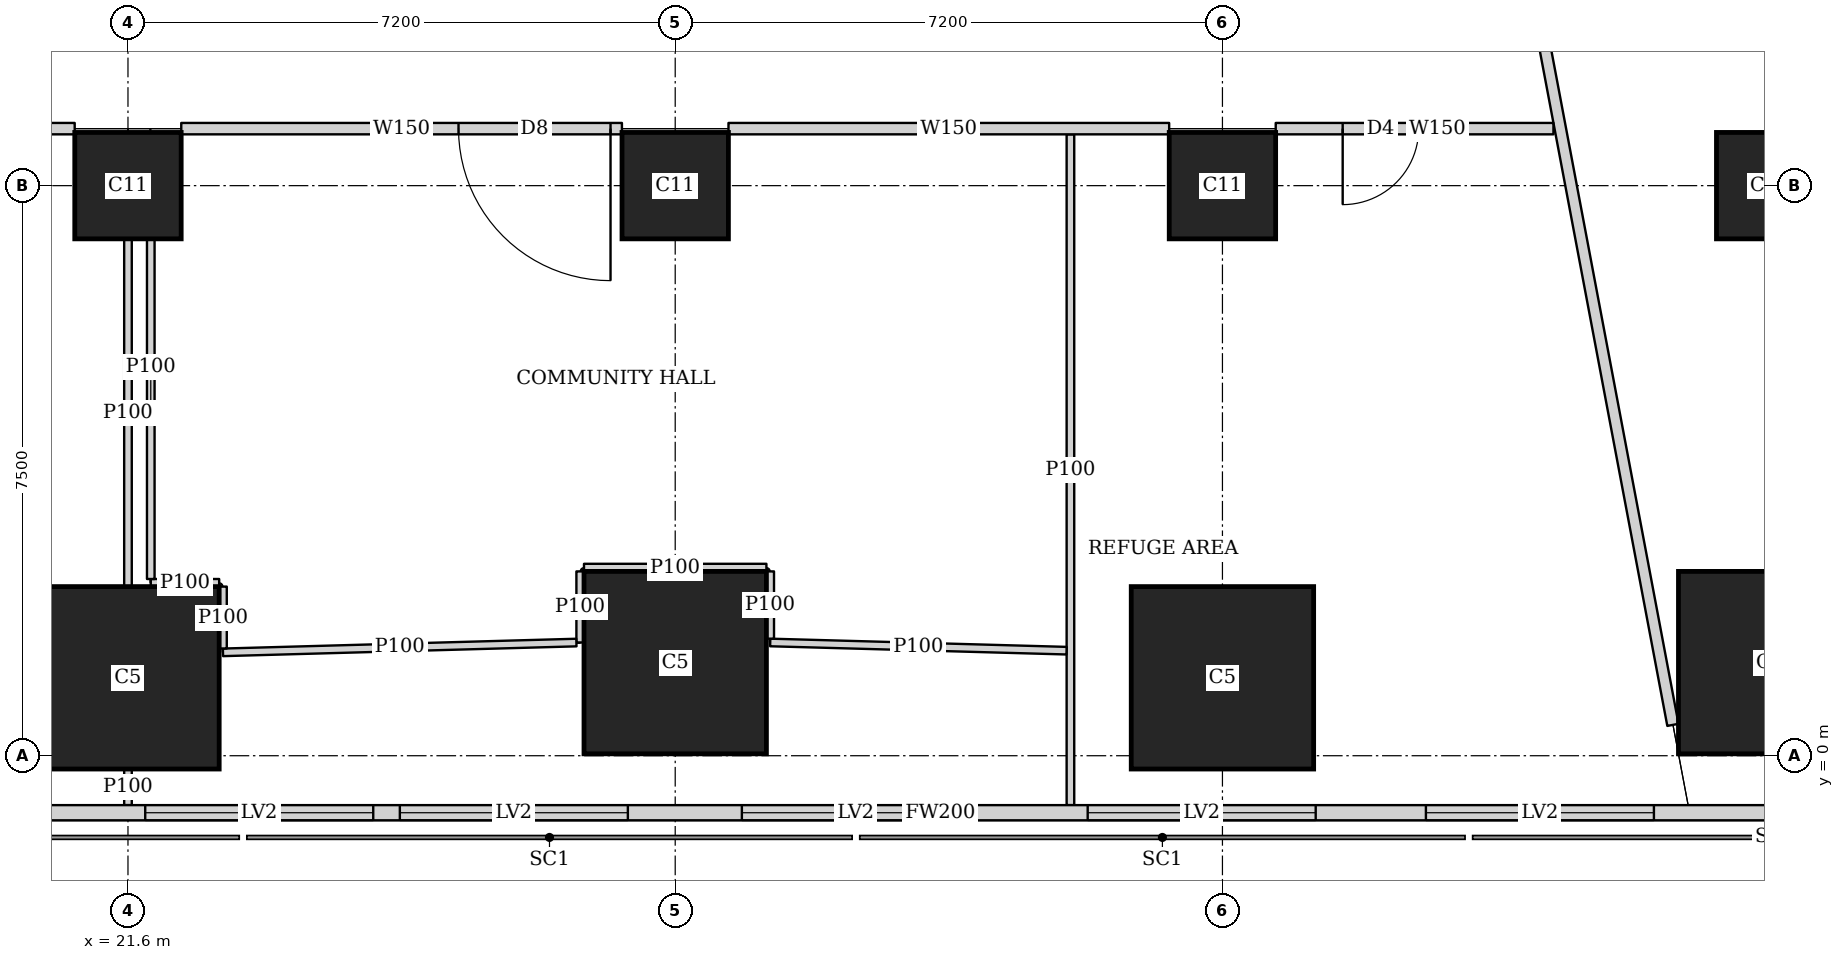
"""IFC4 building model, lengths in metres.
Left out: names, types, materials, properties, quantities, classifications, styles, units other than length and angle.
Written with IfcOpenShell. Run it as: python <this file> out.ifc"""

import sys

from ifc_helpers import new_model, si_unit, direction, frame, frame_2d, origin, origin_2d, place, context, subcontext, project, spatial, rectangle, extrude, element, fill, save


model = new_model("IFC4")
c1 = context("Model", 3, precision=1e-05, world=origin(), true_north=direction((0.0, 1.0)))
c2 = subcontext(c1, "Body", "Model", "MODEL_VIEW")
j1 = project(units=[si_unit("LENGTHUNIT", "METRE"), si_unit("PLANEANGLEUNIT", "RADIAN")], contexts=[c1])
p1 = place(None, origin())
s1 = spatial("IfcSite", under=j1, at=p1, CompositionType="ELEMENT")
p2 = place(p1, origin())
s2 = spatial("IfcBuilding", under=s1, at=p2, CompositionType="ELEMENT")
p3 = place(p2, frame((0.0, 0.0, 246.2)))
s3 = spatial("IfcBuildingStorey", under=s2, at=p3, CompositionType="ELEMENT", Elevation=246.2)
for number, where, z_axis, x_axis in (
    (1, (21.6, 1.025, 0.0), (0.0, 0.0, 1.0), (1.0, 0.0, 0.0)),
    (2, (28.8, 1.225, 0.0), (0.0, 0.0, 1.0), (1.0, 0.0, 0.0)),
    (3, (36.0, 1.025, 0.0), (0.0, 0.0, 1.0), (1.0, 0.0, 0.0)),
    (4, (43.2, 1.225, 0.0), (0.0, 0.0, 1.0), (1.0, 0.0, 0.0)),
):
    element("IfcColumn", number, at=place(p3, frame(where, z_axis=z_axis, x_axis=x_axis)), inside=s3, PredefinedType="COLUMN", context=c2, shape_type="SweptSolid", body=[
        extrude(rectangle(XDim=2.4, YDim=2.4, at=origin_2d()), origin(), (0.0, 0.0, 1.0), 5.4),
    ])
for number, where, z_axis, x_axis in (
    (5, (21.6, 7.5, 0.0), (0.0, 0.0, 1.0), (1.0, 0.0, 0.0)),
    (6, (28.8, 7.5, 0.0), (0.0, 0.0, 1.0), (1.0, 0.0, 0.0)),
    (7, (36.0, 7.5, 0.0), (0.0, 0.0, 1.0), (1.0, 0.0, 0.0)),
    (8, (43.2, 7.5, 0.0), (0.0, 0.0, 1.0), (1.0, 0.0, 0.0)),
):
    element("IfcColumn", number, at=place(p3, frame(where, z_axis=z_axis, x_axis=x_axis)), inside=s3, PredefinedType="COLUMN", context=c2, shape_type="SweptSolid", body=[
        extrude(rectangle(XDim=1.4, YDim=1.4, at=origin_2d()), origin(), (0.0, 0.0, 1.0), 5.4),
    ])
p4 = place(p3, frame((16.787, -0.75, 0.0), z_axis=(0.0, 0.0, 1.0), x_axis=(1.0, 0.0, 0.0)))
e9 = element("IfcWall", 9, at=p4, inside=s3, PredefinedType="SOLIDWALL", context=c2, shape_type="SweptSolid", body=[
    extrude(rectangle(XDim=31.004, YDim=0.2, at=frame_2d((15.502, 0.0))), origin(), (0.0, 0.0, 1.0), 5.15),
])
p5 = place(p4, frame((5.04, 0.0, 0.6)))
e10 = element("IfcOpeningElement", 10, at=p5, cuts=e9, PredefinedType="OPENING", context=c2, shape_type="SweptSolid", body=[
    extrude(rectangle(XDim=3.0, YDim=2.7, at=frame_2d((1.5, 1.35))), frame((0.0, 0.11, 0.0), z_axis=(0.0, -1.0, 0.0), x_axis=(1.0, 0.0, 0.0)), (0.0, 0.0, 1.0), 0.22),
])
p6 = place(p4, frame((8.39, 0.0, 0.6)))
e11 = element("IfcOpeningElement", 11, at=p6, cuts=e9, PredefinedType="OPENING", context=c2, shape_type="SweptSolid", body=[
    extrude(rectangle(XDim=3.0, YDim=2.7, at=frame_2d((1.5, 1.35))), frame((0.0, 0.11, 0.0), z_axis=(0.0, -1.0, 0.0), x_axis=(1.0, 0.0, 0.0)), (0.0, 0.0, 1.0), 0.22),
])
p7 = place(p4, frame((12.89, 0.0, 0.6)))
e12 = element("IfcOpeningElement", 12, at=p7, cuts=e9, PredefinedType="OPENING", context=c2, shape_type="SweptSolid", body=[
    extrude(rectangle(XDim=3.0, YDim=2.7, at=frame_2d((1.5, 1.35))), frame((0.0, 0.11, 0.0), z_axis=(0.0, -1.0, 0.0), x_axis=(1.0, 0.0, 0.0)), (0.0, 0.0, 1.0), 0.22),
])
p8 = place(p4, frame((17.44, 0.0, 0.6)))
e13 = element("IfcOpeningElement", 13, at=p8, cuts=e9, PredefinedType="OPENING", context=c2, shape_type="SweptSolid", body=[
    extrude(rectangle(XDim=3.0, YDim=2.7, at=frame_2d((1.5, 1.35))), frame((0.0, 0.11, 0.0), z_axis=(0.0, -1.0, 0.0), x_axis=(1.0, 0.0, 0.0)), (0.0, 0.0, 1.0), 0.22),
])
p9 = place(p4, frame((21.89, 0.0, 0.6)))
e14 = element("IfcOpeningElement", 14, at=p9, cuts=e9, PredefinedType="OPENING", context=c2, shape_type="SweptSolid", body=[
    extrude(rectangle(XDim=3.0, YDim=2.7, at=frame_2d((1.5, 1.35))), frame((0.0, 0.11, 0.0), z_axis=(0.0, -1.0, 0.0), x_axis=(1.0, 0.0, 0.0)), (0.0, 0.0, 1.0), 0.22),
])
p10 = place(p4, frame((26.39, 0.0, 0.6)))
e15 = element("IfcOpeningElement", 15, at=p10, cuts=e9, PredefinedType="OPENING", context=c2, shape_type="SweptSolid", body=[
    extrude(rectangle(XDim=3.0, YDim=2.7, at=frame_2d((1.5, 1.35))), frame((0.0, 0.11, 0.0), z_axis=(0.0, -1.0, 0.0), x_axis=(1.0, 0.0, 0.0)), (0.0, 0.0, 1.0), 0.22),
])
p11 = place(p3, frame((50.653, 2.703, 0.0), z_axis=(0.0, 0.0, 1.0), x_axis=(-0.185612026696, 0.982623109613, 0.0)))
e16 = element("IfcWall", 16, at=p11, inside=s3, PredefinedType="SOLIDWALL", context=c2, shape_type="SweptSolid", body=[
    extrude(rectangle(XDim=41.393, YDim=0.2, at=frame_2d((20.697, 0.0))), origin(), (0.0, 0.0, 1.0), 5.15),
])
p12 = place(p11, frame((1.197, 0.0, 0.6)))
e17 = element("IfcOpeningElement", 17, at=p12, cuts=e16, PredefinedType="OPENING", context=c2, shape_type="SweptSolid", body=[
    extrude(rectangle(XDim=3.0, YDim=2.7, at=frame_2d((1.5, 1.35))), frame((0.0, 0.11, 0.0), z_axis=(0.0, -1.0, 0.0), x_axis=(1.0, 0.0, 0.0)), (0.0, 0.0, 1.0), 0.22),
])
p13 = place(p11, frame((5.697, 0.0, 0.6)))
e18 = element("IfcOpeningElement", 18, at=p13, cuts=e16, PredefinedType="OPENING", context=c2, shape_type="SweptSolid", body=[
    extrude(rectangle(XDim=3.0, YDim=2.7, at=frame_2d((1.5, 1.35))), frame((0.0, 0.11, 0.0), z_axis=(0.0, -1.0, 0.0), x_axis=(1.0, 0.0, 0.0)), (0.0, 0.0, 1.0), 0.22),
])
p14 = place(p11, frame((10.197, 0.0, 0.6)))
e19 = element("IfcOpeningElement", 19, at=p14, cuts=e16, PredefinedType="OPENING", context=c2, shape_type="SweptSolid", body=[
    extrude(rectangle(XDim=3.0, YDim=2.7, at=frame_2d((1.5, 1.35))), frame((0.0, 0.11, 0.0), z_axis=(0.0, -1.0, 0.0), x_axis=(1.0, 0.0, 0.0)), (0.0, 0.0, 1.0), 0.22),
])
p15 = place(p11, frame((14.697, 0.0, 0.6)))
e20 = element("IfcOpeningElement", 20, at=p15, cuts=e16, PredefinedType="OPENING", context=c2, shape_type="SweptSolid", body=[
    extrude(rectangle(XDim=3.0, YDim=2.7, at=frame_2d((1.5, 1.35))), frame((0.0, 0.11, 0.0), z_axis=(0.0, -1.0, 0.0), x_axis=(1.0, 0.0, 0.0)), (0.0, 0.0, 1.0), 0.22),
])
p16 = place(p11, frame((19.197, 0.0, 0.6)))
e21 = element("IfcOpeningElement", 21, at=p16, cuts=e16, PredefinedType="OPENING", context=c2, shape_type="SweptSolid", body=[
    extrude(rectangle(XDim=3.0, YDim=2.7, at=frame_2d((1.5, 1.35))), frame((0.0, 0.11, 0.0), z_axis=(0.0, -1.0, 0.0), x_axis=(1.0, 0.0, 0.0)), (0.0, 0.0, 1.0), 0.22),
])
p17 = place(p11, frame((23.697, 0.0, 0.6)))
e22 = element("IfcOpeningElement", 22, at=p17, cuts=e16, PredefinedType="OPENING", context=c2, shape_type="SweptSolid", body=[
    extrude(rectangle(XDim=3.0, YDim=2.7, at=frame_2d((1.5, 1.35))), frame((0.0, 0.11, 0.0), z_axis=(0.0, -1.0, 0.0), x_axis=(1.0, 0.0, 0.0)), (0.0, 0.0, 1.0), 0.22),
])
p18 = place(p11, frame((28.197, 0.0, 0.6)))
e23 = element("IfcOpeningElement", 23, at=p18, cuts=e16, PredefinedType="OPENING", context=c2, shape_type="SweptSolid", body=[
    extrude(rectangle(XDim=3.0, YDim=2.7, at=frame_2d((1.5, 1.35))), frame((0.0, 0.11, 0.0), z_axis=(0.0, -1.0, 0.0), x_axis=(1.0, 0.0, 0.0)), (0.0, 0.0, 1.0), 0.22),
])
p19 = place(p11, frame((31.497, 0.0, 0.6)))
e24 = element("IfcOpeningElement", 24, at=p19, cuts=e16, PredefinedType="OPENING", context=c2, shape_type="SweptSolid", body=[
    extrude(rectangle(XDim=3.0, YDim=2.7, at=frame_2d((1.5, 1.35))), frame((0.0, 0.11, 0.0), z_axis=(0.0, -1.0, 0.0), x_axis=(1.0, 0.0, 0.0)), (0.0, 0.0, 1.0), 0.22),
])
p20 = place(p11, frame((35.497, 0.0, 0.6)))
e25 = element("IfcOpeningElement", 25, at=p20, cuts=e16, PredefinedType="OPENING", context=c2, shape_type="SweptSolid", body=[
    extrude(rectangle(XDim=3.0, YDim=2.7, at=frame_2d((1.5, 1.35))), frame((0.0, 0.11, 0.0), z_axis=(0.0, -1.0, 0.0), x_axis=(1.0, 0.0, 0.0)), (0.0, 0.0, 1.0), 0.22),
])
p21 = place(p3, frame((40.355, 8.25, 0.0), z_axis=(0.0, 0.0, 1.0), x_axis=(-1.0, 0.0, 0.0)))
e26 = element("IfcWall", 26, at=p21, inside=s3, PredefinedType="SOLIDWALL", context=c2, shape_type="SweptSolid", body=[
    extrude(rectangle(XDim=3.654, YDim=0.15, at=frame_2d((1.827, 0.0))), origin(), (0.0, 0.0, 1.0), 3.55),
])
p22 = place(p21, frame((1.773, 0.0, 0.0)))
e27 = element("IfcOpeningElement", 27, at=p22, cuts=e26, PredefinedType="OPENING", context=c2, shape_type="SweptSolid", body=[
    extrude(rectangle(XDim=1.0, YDim=2.1, at=frame_2d((0.5, 1.05))), frame((0.0, 0.085, 0.0), z_axis=(0.0, -1.0, 0.0), x_axis=(1.0, 0.0, 0.0)), (0.0, 0.0, 1.0), 0.17),
])
p23 = place(p3, frame((35.299, 8.25, 0.0), z_axis=(0.0, 0.0, 1.0), x_axis=(-1.0, 0.0, 0.0)))
e28 = element("IfcWall", 28, at=p23, inside=s3, PredefinedType="SOLIDWALL", context=c2, shape_type="SweptSolid", body=[
    extrude(rectangle(XDim=5.798, YDim=0.15, at=frame_2d((2.899, 0.0))), origin(), (0.0, 0.0, 1.0), 2.75),
])
p24 = place(p3, frame((28.099, 8.25, 0.0), z_axis=(0.0, 0.0, 1.0), x_axis=(-1.0, 0.0, 0.0)))
e29 = element("IfcWall", 29, at=p24, inside=s3, PredefinedType="SOLIDWALL", context=c2, shape_type="SweptSolid", body=[
    extrude(rectangle(XDim=5.798, YDim=0.15, at=frame_2d((2.899, 0.0))), origin(), (0.0, 0.0, 1.0), 2.75),
])
p25 = place(p24, frame((0.15, 0.0, 0.0)))
e30 = element("IfcOpeningElement", 30, at=p25, cuts=e29, PredefinedType="OPENING", context=c2, shape_type="SweptSolid", body=[
    extrude(rectangle(XDim=2.0, YDim=2.1, at=frame_2d((1.0, 1.05))), frame((0.0, 0.085, 0.0), z_axis=(0.0, -1.0, 0.0), x_axis=(1.0, 0.0, 0.0)), (0.0, 0.0, 1.0), 0.17),
])
p26 = place(p3, frame((20.899, 8.25, 0.0), z_axis=(0.0, 0.0, 1.0), x_axis=(-1.0, 0.0, 0.0)))
e31 = element("IfcWall", 31, at=p26, inside=s3, PredefinedType="SOLIDWALL", context=c2, shape_type="SweptSolid", body=[
    extrude(rectangle(XDim=4.644, YDim=0.15, at=frame_2d((2.322, 0.0))), origin(), (0.0, 0.0, 1.0), 2.75),
])
p27 = place(p26, frame((2.424, 0.0, 0.0)))
e32 = element("IfcOpeningElement", 32, at=p27, cuts=e31, PredefinedType="OPENING", context=c2, shape_type="SweptSolid", body=[
    extrude(rectangle(XDim=1.8, YDim=2.4, at=frame_2d((0.9, 1.2))), frame((0.0, 0.085, 0.0), z_axis=(0.0, -1.0, 0.0), x_axis=(1.0, 0.0, 0.0)), (0.0, 0.0, 1.0), 0.17),
])
p28 = place(p3, frame((33.382, 45.65, 0.0), z_axis=(0.0, 0.0, 1.0), x_axis=(0.185582712124, -0.982628646519, 0.0)))
e33 = element("IfcWall", 33, at=p28, inside=s3, PredefinedType="SOLIDWALL", context=c2, shape_type="SweptSolid", body=[
    extrude(rectangle(XDim=46.044, YDim=0.15, at=frame_2d((23.022, 0.0))), origin(), (0.0, 0.0, 1.0), 3.35),
])
p29 = place(p28, frame((24.35, 0.0, 0.0)))
e34 = element("IfcOpeningElement", 34, at=p29, cuts=e33, PredefinedType="OPENING", context=c2, shape_type="SweptSolid", body=[
    extrude(rectangle(XDim=1.0, YDim=2.1, at=frame_2d((0.5, 1.05))), frame((0.0, 0.085, 0.0), z_axis=(0.0, -1.0, 0.0), x_axis=(1.0, 0.0, 0.0)), (0.0, 0.0, 1.0), 0.17),
])
p30 = place(p3, frame((21.6, -0.65, 0.0), z_axis=(0.0, 0.0, 1.0), x_axis=(0.0, 1.0, 0.0)))
e35 = element("IfcWall", 35, at=p30, inside=s3, PredefinedType="PARTITIONING", context=c2, shape_type="SweptSolid", body=[
    extrude(rectangle(XDim=0.474, YDim=0.1, at=frame_2d((0.237, 0.0))), origin(), (0.0, 0.0, 1.0), 3.35),
])
p31 = place(p3, frame((21.6, 2.226, 0.0), z_axis=(0.0, 0.0, 1.0), x_axis=(0.0, 1.0, 0.0)))
e36 = element("IfcWall", 36, at=p31, inside=s3, PredefinedType="PARTITIONING", context=c2, shape_type="SweptSolid", body=[
    extrude(rectangle(XDim=4.573, YDim=0.1, at=frame_2d((2.287, 0.0))), origin(), (0.0, 0.0, 1.0), 2.75),
])
p32 = place(p3, frame((34.0, -0.65, 0.0), z_axis=(0.0, 0.0, 1.0), x_axis=(0.0, 1.0, 0.0)))
e37 = element("IfcWall", 37, at=p32, inside=s3, PredefinedType="PARTITIONING", context=c2, shape_type="SweptSolid", body=[
    extrude(rectangle(XDim=8.825, YDim=0.1, at=frame_2d((4.413, 0.0))), origin(), (0.0, 0.0, 1.0), 3.35),
])
p33 = place(p3, frame((33.949, 1.382, 0.0), z_axis=(0.0, 0.0, 1.0), x_axis=(-0.999617214664, 0.027666299867, 0.0)))
e38 = element("IfcWall", 38, at=p33, inside=s3, PredefinedType="PARTITIONING", context=c2, shape_type="SweptSolid", body=[
    extrude(rectangle(XDim=3.9, YDim=0.1, at=frame_2d((1.95, 0.0))), origin(), (0.0, 0.0, 1.0), 3.35),
])
p34 = place(p3, frame((30.05, 1.54, 0.0), z_axis=(0.0, 0.0, 1.0), x_axis=(0.0, 1.0, 0.0)))
e39 = element("IfcWall", 39, at=p34, inside=s3, PredefinedType="PARTITIONING", context=c2, shape_type="SweptSolid", body=[
    extrude(rectangle(XDim=0.885, YDim=0.1, at=frame_2d((0.442, 0.0))), origin(), (0.0, 0.0, 1.0), 3.35),
])
p35 = place(p3, frame((30.0, 2.475, 0.0), z_axis=(0.0, 0.0, 1.0), x_axis=(-1.0, 0.0, 0.0)))
e40 = element("IfcWall", 40, at=p35, inside=s3, PredefinedType="PARTITIONING", context=c2, shape_type="SweptSolid", body=[
    extrude(rectangle(XDim=2.4, YDim=0.1, at=frame_2d((1.2, 0.0))), origin(), (0.0, 0.0, 1.0), 3.55),
])
p36 = place(p3, frame((27.55, 2.425, 0.0), z_axis=(0.0, 0.0, 1.0), x_axis=(0.0, -1.0, 0.0)))
e41 = element("IfcWall", 41, at=p36, inside=s3, PredefinedType="PARTITIONING", context=c2, shape_type="SweptSolid", body=[
    extrude(rectangle(XDim=0.935, YDim=0.1, at=frame_2d((0.468, 0.0))), origin(), (0.0, 0.0, 1.0), 3.35),
])
p37 = place(p3, frame((27.5, 1.489, 0.0), z_axis=(0.0, 0.0, 1.0), x_axis=(-0.999615956825, -0.027711709819, 0.0)))
e42 = element("IfcWall", 42, at=p37, inside=s3, PredefinedType="PARTITIONING", context=c2, shape_type="SweptSolid", body=[
    extrude(rectangle(XDim=4.652, YDim=0.1, at=frame_2d((2.326, 0.0))), origin(), (0.0, 0.0, 1.0), 3.35),
])
p38 = place(p3, frame((22.85, 1.411, 0.0), z_axis=(0.0, 0.0, 1.0), x_axis=(0.0, 1.0, 0.0)))
e43 = element("IfcWall", 43, at=p38, inside=s3, PredefinedType="PARTITIONING", context=c2, shape_type="SweptSolid", body=[
    extrude(rectangle(XDim=0.814, YDim=0.1, at=frame_2d((0.407, 0.0))), origin(), (0.0, 0.0, 1.0), 3.35),
])
p39 = place(p3, frame((22.8, 2.275, 0.0), z_axis=(0.0, 0.0, 1.0), x_axis=(-1.0, 0.0, 0.0)))
e44 = element("IfcWall", 44, at=p39, inside=s3, PredefinedType="PARTITIONING", context=c2, shape_type="SweptSolid", body=[
    extrude(rectangle(XDim=0.9, YDim=0.1, at=frame_2d((0.45, 0.0))), origin(), (0.0, 0.0, 1.0), 3.35),
])
p40 = place(p3, frame((21.9, 2.325, 0.0), z_axis=(0.0, 0.0, 1.0), x_axis=(0.0, 1.0, 0.0)))
e45 = element("IfcWall", 45, at=p40, inside=s3, PredefinedType="PARTITIONING", context=c2, shape_type="SweptSolid", body=[
    extrude(rectangle(XDim=4.474, YDim=0.1, at=frame_2d((2.237, 0.0))), origin(), (0.0, 0.0, 1.0), 2.75),
])
p41 = place(p5, origin())
e46 = element("IfcWindow", 46, at=p41, inside=s3, PartitioningType="SINGLE_PANEL", PredefinedType="USERDEFINED", context=c2, shape_type="SweptSolid", body=[
    extrude(rectangle(XDim=3.0, YDim=2.7, at=frame_2d((1.5, 1.35))), frame((0.0, 0.03, 0.0), z_axis=(0.0, -1.0, 0.0), x_axis=(1.0, 0.0, 0.0)), (0.0, 0.0, 1.0), 0.06),
])
fill(e10, e46)
p42 = place(p6, origin())
e47 = element("IfcWindow", 47, at=p42, inside=s3, PartitioningType="SINGLE_PANEL", PredefinedType="USERDEFINED", context=c2, shape_type="SweptSolid", body=[
    extrude(rectangle(XDim=3.0, YDim=2.7, at=frame_2d((1.5, 1.35))), frame((0.0, 0.03, 0.0), z_axis=(0.0, -1.0, 0.0), x_axis=(1.0, 0.0, 0.0)), (0.0, 0.0, 1.0), 0.06),
])
fill(e11, e47)
p43 = place(p7, origin())
e48 = element("IfcWindow", 48, at=p43, inside=s3, PartitioningType="SINGLE_PANEL", PredefinedType="USERDEFINED", context=c2, shape_type="SweptSolid", body=[
    extrude(rectangle(XDim=3.0, YDim=2.7, at=frame_2d((1.5, 1.35))), frame((0.0, 0.03, 0.0), z_axis=(0.0, -1.0, 0.0), x_axis=(1.0, 0.0, 0.0)), (0.0, 0.0, 1.0), 0.06),
])
fill(e12, e48)
p44 = place(p8, origin())
e49 = element("IfcWindow", 49, at=p44, inside=s3, PartitioningType="SINGLE_PANEL", PredefinedType="USERDEFINED", context=c2, shape_type="SweptSolid", body=[
    extrude(rectangle(XDim=3.0, YDim=2.7, at=frame_2d((1.5, 1.35))), frame((0.0, 0.03, 0.0), z_axis=(0.0, -1.0, 0.0), x_axis=(1.0, 0.0, 0.0)), (0.0, 0.0, 1.0), 0.06),
])
fill(e13, e49)
p45 = place(p9, origin())
e50 = element("IfcWindow", 50, at=p45, inside=s3, PartitioningType="SINGLE_PANEL", PredefinedType="USERDEFINED", context=c2, shape_type="SweptSolid", body=[
    extrude(rectangle(XDim=3.0, YDim=2.7, at=frame_2d((1.5, 1.35))), frame((0.0, 0.03, 0.0), z_axis=(0.0, -1.0, 0.0), x_axis=(1.0, 0.0, 0.0)), (0.0, 0.0, 1.0), 0.06),
])
fill(e14, e50)
p46 = place(p25, origin())
e51 = element("IfcDoor", 51, at=p46, inside=s3, OperationType="DOUBLE_DOOR_SINGLE_SWING", PredefinedType="DOOR", context=c2, shape_type="SweptSolid", body=[
    extrude(rectangle(XDim=2.0, YDim=2.1, at=frame_2d((1.0, 1.05))), frame((0.0, 0.025, 0.0), z_axis=(0.0, -1.0, 0.0), x_axis=(1.0, 0.0, 0.0)), (0.0, 0.0, 1.0), 0.05),
])
fill(e30, e51)
p47 = place(p22, origin())
e52 = element("IfcDoor", 52, at=p47, inside=s3, OperationType="SINGLE_SWING_RIGHT", PredefinedType="DOOR", context=c2, shape_type="SweptSolid", body=[
    extrude(rectangle(XDim=1.0, YDim=2.1, at=frame_2d((0.5, 1.05))), frame((0.0, 0.025, 0.0), z_axis=(0.0, -1.0, 0.0), x_axis=(1.0, 0.0, 0.0)), (0.0, 0.0, 1.0), 0.05),
])
fill(e27, e52)
save(model, sys.argv[1])
